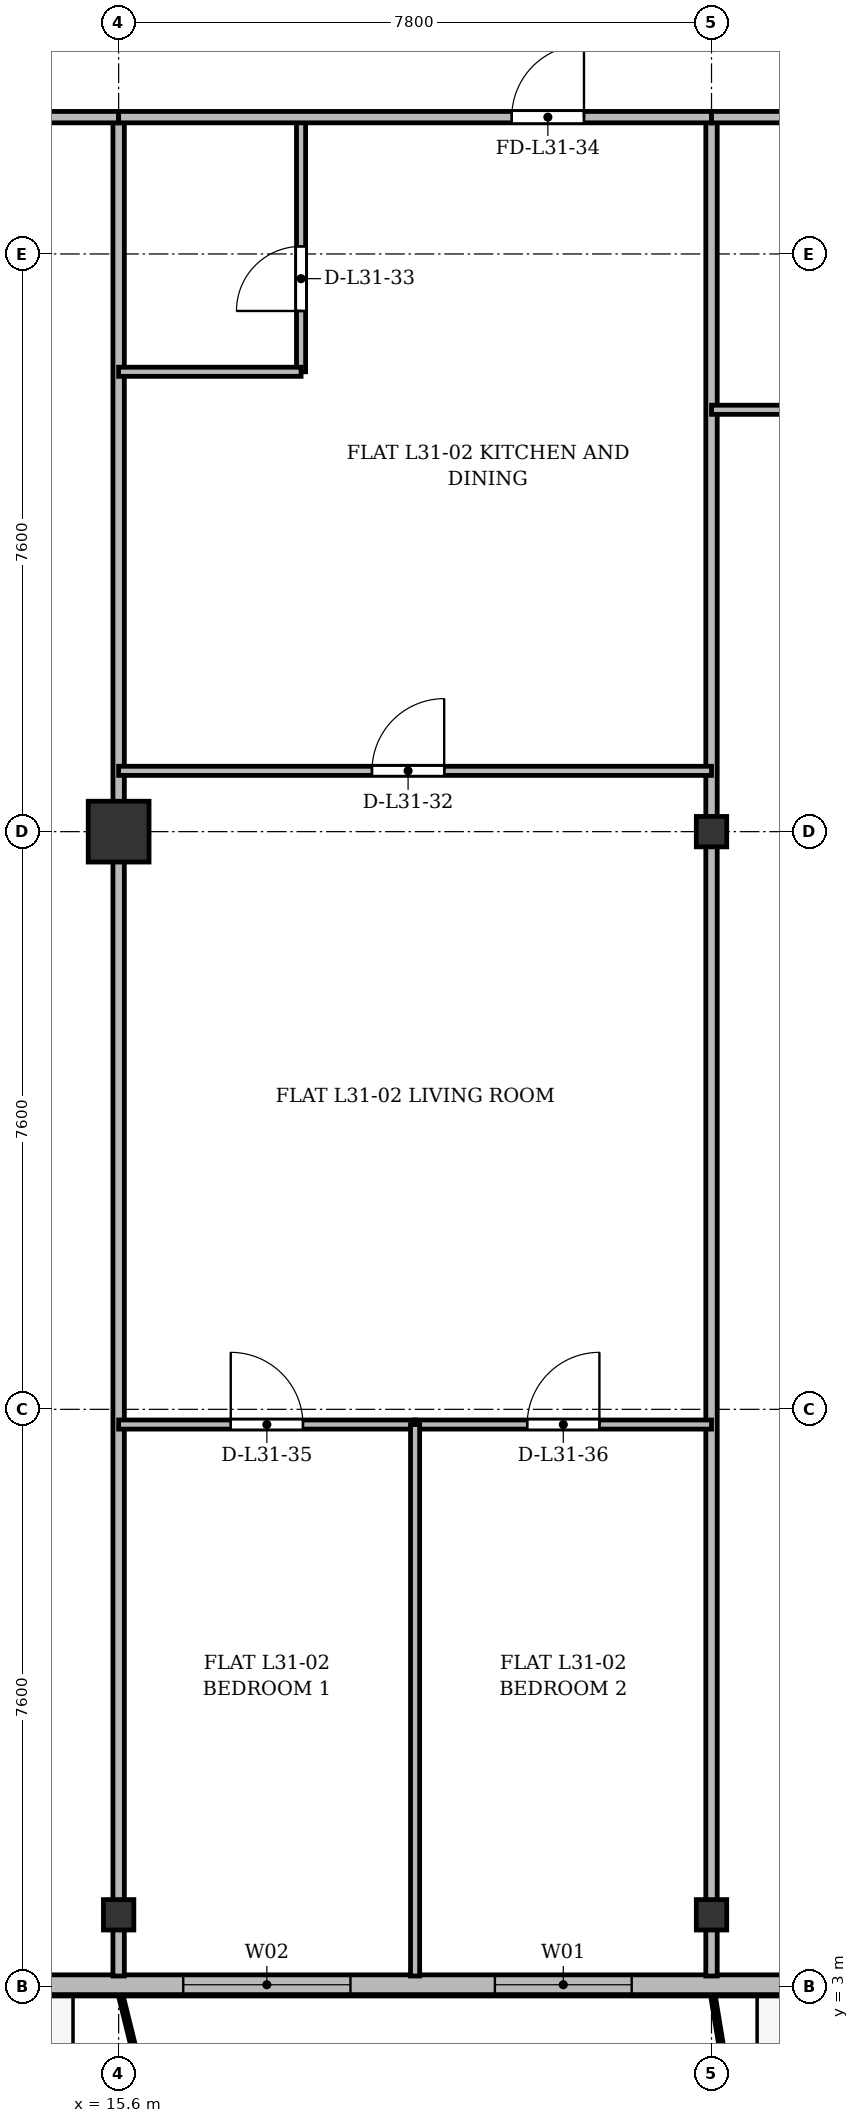
"""IFC4 building model, lengths in metres.
Left out: names, types, materials, properties, quantities, classifications, styles, units other than length and angle.
Written with IfcOpenShell. Run it as: python <this file> out.ifc"""

import sys

from ifc_helpers import new_model, si_unit, direction, frame, frame_2d, origin, origin_2d, place, context, subcontext, project, spatial, rectangle, i_section, extrude, source, transform, mapped, element, fill, save


model = new_model("IFC4")
c1 = context("Model", 3, precision=1e-05, world=origin(), true_north=direction((0.0, 1.0)))
c2 = subcontext(c1, "Body", "Model", "MODEL_VIEW")
j1 = project(units=[si_unit("LENGTHUNIT", "METRE"), si_unit("PLANEANGLEUNIT", "RADIAN")], contexts=[c1])
p1 = place(None, origin())
s1 = spatial("IfcSite", under=j1, at=p1, CompositionType="ELEMENT")
p2 = place(p1, origin())
s2 = spatial("IfcBuilding", under=s1, at=p2, CompositionType="ELEMENT")
p3 = place(p2, frame((0.0, 0.0, 121.3)))
s3 = spatial("IfcBuildingStorey", under=s2, at=p3, CompositionType="ELEMENT", Elevation=121.3)
m1 = source(origin(), c2, "Body", "SweptSolid", [
    extrude(i_section(OverallWidth=0.4, OverallDepth=0.4, WebThickness=0.022, FlangeThickness=0.035, at=origin_2d()), origin(), (0.0, 0.0, 1.0), 3.6),
])
p4 = place(p3, frame((15.6, 3.95, 0.0), z_axis=(0.0, 0.0, 1.0), x_axis=(1.0, 0.0, 0.0)))
e1 = element("IfcColumn", 1, at=p4, inside=s3, PredefinedType="COLUMN", context=c2, shape_type="MappedRepresentation", body=[
    mapped(m1, transform((0.0, 0.0, 0.0), x_axis=(1.0, 0.0, 0.0), y_axis=(0.0, 1.0, 0.0), z_axis=(0.0, 0.0, 1.0), scale=1.0)),
])
m2 = source(origin(), c2, "Body", "SweptSolid", [
    extrude(rectangle(XDim=0.8, YDim=0.8, at=origin_2d()), origin(), (0.0, 0.0, 1.0), 3.6),
])
p5 = place(p3, frame((15.6, 18.2, 0.0), z_axis=(0.0, 0.0, 1.0), x_axis=(1.0, 0.0, 0.0)))
e2 = element("IfcColumn", 2, at=p5, inside=s3, PredefinedType="COLUMN", context=c2, shape_type="MappedRepresentation", body=[
    mapped(m2, transform((0.0, 0.0, 0.0), x_axis=(1.0, 0.0, 0.0), y_axis=(0.0, 1.0, 0.0), z_axis=(0.0, 0.0, 1.0), scale=1.0)),
])
for number, where, z_axis, x_axis in (
    (3, (23.4, 3.95, 0.0), (0.0, 0.0, 1.0), (1.0, 0.0, 0.0)),
    (4, (23.4, 18.2, 0.0), (0.0, 0.0, 1.0), (1.0, 0.0, 0.0)),
):
    element("IfcColumn", number, at=place(p3, frame(where, z_axis=z_axis, x_axis=x_axis)), inside=s3, PredefinedType="COLUMN", context=c2, shape_type="MappedRepresentation", body=[
        mapped(m1, transform((0.0, 0.0, 0.0), x_axis=(1.0, 0.0, 0.0), y_axis=(0.0, 1.0, 0.0), z_axis=(0.0, 0.0, 1.0), scale=1.0)),
    ])
p6 = place(p3, frame((44.8, 3.03, 0.0), z_axis=(0.0, 0.0, 1.0), x_axis=(-1.0, 0.0, 0.0)))
e5 = element("IfcWall", 5, at=p6, inside=s3, PredefinedType="SOLIDWALL", context=c2, shape_type="SweptSolid", body=[
    extrude(rectangle(XDim=37.3, YDim=0.26, at=frame_2d((18.65, 0.0))), origin(), (0.0, 0.0, 1.0), 3.34),
])
p7 = place(p6, frame((3.15, 0.0, 0.9)))
e6 = element("IfcOpeningElement", 6, at=p7, cuts=e5, PredefinedType="OPENING", context=c2, shape_type="SweptSolid", body=[
    extrude(rectangle(XDim=1.5, YDim=1.75, at=frame_2d((0.75, 0.875))), frame((0.0, 0.14, 0.0), z_axis=(0.0, -1.0, 0.0), x_axis=(1.0, 0.0, 0.0)), (0.0, 0.0, 1.0), 0.28),
])
p8 = place(p6, frame((9.5, 0.0, 0.9)))
e7 = element("IfcOpeningElement", 7, at=p8, cuts=e5, PredefinedType="OPENING", context=c2, shape_type="SweptSolid", body=[
    extrude(rectangle(XDim=2.0, YDim=1.95, at=frame_2d((1.0, 0.975))), frame((0.0, 0.14, 0.0), z_axis=(0.0, -1.0, 0.0), x_axis=(1.0, 0.0, 0.0)), (0.0, 0.0, 1.0), 0.28),
])
p9 = place(p6, frame((17.109, 0.0, 0.0)))
e8 = element("IfcOpeningElement", 8, at=p9, cuts=e5, PredefinedType="OPENING", context=c2, shape_type="SweptSolid", body=[
    extrude(rectangle(XDim=1.2, YDim=2.2, at=frame_2d((0.6, 1.1))), frame((0.0, 0.14, 0.0), z_axis=(0.0, -1.0, 0.0), x_axis=(1.0, 0.0, 0.0)), (0.0, 0.0, 1.0), 0.28),
])
p10 = place(p6, frame((22.45, 0.0, 0.9)))
e9 = element("IfcOpeningElement", 9, at=p10, cuts=e5, PredefinedType="OPENING", context=c2, shape_type="SweptSolid", body=[
    extrude(rectangle(XDim=1.8, YDim=1.8, at=frame_2d((0.9, 0.9))), frame((0.0, 0.14, 0.0), z_axis=(0.0, -1.0, 0.0), x_axis=(1.0, 0.0, 0.0)), (0.0, 0.0, 1.0), 0.28),
])
p11 = place(p6, frame((26.15, 0.0, 0.9)))
e10 = element("IfcOpeningElement", 10, at=p11, cuts=e5, PredefinedType="OPENING", context=c2, shape_type="SweptSolid", body=[
    extrude(rectangle(XDim=2.2, YDim=1.8, at=frame_2d((1.1, 0.9))), frame((0.0, 0.14, 0.0), z_axis=(0.0, -1.0, 0.0), x_axis=(1.0, 0.0, 0.0)), (0.0, 0.0, 1.0), 0.28),
])
p12 = place(p6, frame((33.727, 0.0, 0.0)))
e11 = element("IfcOpeningElement", 11, at=p12, cuts=e5, PredefinedType="OPENING", context=c2, shape_type="SweptSolid", body=[
    extrude(rectangle(XDim=1.2, YDim=2.2, at=frame_2d((0.6, 1.1))), frame((0.0, 0.14, 0.0), z_axis=(0.0, -1.0, 0.0), x_axis=(1.0, 0.0, 0.0)), (0.0, 0.0, 1.0), 0.28),
])
for number, where, z_axis, x_axis in (
    (12, (15.6, 3.145, 0.0), (0.0, 0.0, 1.0), (0.0, 1.0, 0.0)),
    (13, (23.4, 3.145, 0.0), (0.0, 0.0, 1.0), (0.0, 1.0, 0.0)),
):
    element("IfcWall", number, at=place(p3, frame(where, z_axis=z_axis, x_axis=x_axis)), inside=s3, PredefinedType="PARTITIONING", context=c2, shape_type="SweptSolid", body=[
        extrude(rectangle(XDim=24.455, YDim=0.15, at=frame_2d((12.228, 0.0))), origin(), (0.0, 0.0, 1.0), 2.84),
    ])
p13 = place(p3, frame((4.745, 27.6, 0.0), z_axis=(0.0, 0.0, 1.0), x_axis=(1.0, 0.0, 0.0)))
e14 = element("IfcWall", 14, at=p13, inside=s3, PredefinedType="PARTITIONING", context=c2, shape_type="SweptSolid", body=[
    extrude(rectangle(XDim=10.855, YDim=0.15, at=frame_2d((5.427, 0.0))), origin(), (0.0, 0.0, 1.0), 2.84),
])
p14 = place(p13, frame((4.537, 0.0, 0.0)))
e15 = element("IfcOpeningElement", 15, at=p14, cuts=e14, PredefinedType="OPENING", context=c2, shape_type="SweptSolid", body=[
    extrude(rectangle(XDim=1.6, YDim=2.2, at=frame_2d((0.8, 1.1))), frame((0.0, 0.085, 0.0), z_axis=(0.0, -1.0, 0.0), x_axis=(1.0, 0.0, 0.0)), (0.0, 0.0, 1.0), 0.17),
])
p15 = place(p3, frame((15.6, 19.0, 0.0), z_axis=(0.0, 0.0, 1.0), x_axis=(1.0, 0.0, 0.0)))
e16 = element("IfcWall", 16, at=p15, inside=s3, PredefinedType="PARTITIONING", context=c2, shape_type="SweptSolid", body=[
    extrude(rectangle(XDim=7.8, YDim=0.12, at=frame_2d((3.9, 0.0))), origin(), (0.0, 0.0, 1.0), 2.84),
])
p16 = place(p15, frame((3.333, 0.0, 0.0)))
e17 = element("IfcOpeningElement", 17, at=p16, cuts=e16, PredefinedType="OPENING", context=c2, shape_type="SweptSolid", body=[
    extrude(rectangle(XDim=0.95, YDim=2.15, at=frame_2d((0.475, 1.075))), frame((0.0, 0.07, 0.0), z_axis=(0.0, -1.0, 0.0), x_axis=(1.0, 0.0, 0.0)), (0.0, 0.0, 1.0), 0.14),
])
p17 = place(p3, frame((18.0, 24.25, 0.0), z_axis=(0.0, 0.0, 1.0), x_axis=(0.0, 1.0, 0.0)))
e18 = element("IfcWall", 18, at=p17, inside=s3, PredefinedType="PARTITIONING", context=c2, shape_type="SweptSolid", body=[
    extrude(rectangle(XDim=3.35, YDim=0.12, at=frame_2d((1.675, 0.0))), origin(), (0.0, 0.0, 1.0), 2.99),
])
p18 = place(p17, frame((0.8, 0.0, 0.0)))
e19 = element("IfcOpeningElement", 19, at=p18, cuts=e18, PredefinedType="OPENING", context=c2, shape_type="SweptSolid", body=[
    extrude(rectangle(XDim=0.85, YDim=2.1, at=frame_2d((0.425, 1.05))), frame((0.0, 0.07, 0.0), z_axis=(0.0, -1.0, 0.0), x_axis=(1.0, 0.0, 0.0)), (0.0, 0.0, 1.0), 0.14),
])
p19 = place(p3, frame((15.6, 24.25, 0.0), z_axis=(0.0, 0.0, 1.0), x_axis=(1.0, 0.0, 0.0)))
e20 = element("IfcWall", 20, at=p19, inside=s3, PredefinedType="PARTITIONING", context=c2, shape_type="SweptSolid", body=[
    extrude(rectangle(XDim=2.4, YDim=0.12, at=frame_2d((1.2, 0.0))), origin(), (0.0, 0.0, 1.0), 2.84),
])
p20 = place(p3, frame((15.6, 27.6, 0.0), z_axis=(0.0, 0.0, 1.0), x_axis=(1.0, 0.0, 0.0)))
e21 = element("IfcWall", 21, at=p20, inside=s3, PredefinedType="PARTITIONING", context=c2, shape_type="SweptSolid", body=[
    extrude(rectangle(XDim=7.8, YDim=0.15, at=frame_2d((3.9, 0.0))), origin(), (0.0, 0.0, 1.0), 2.84),
])
p21 = place(p20, frame((5.172, 0.0, 0.0)))
e22 = element("IfcOpeningElement", 22, at=p21, cuts=e21, PredefinedType="OPENING", context=c2, shape_type="SweptSolid", body=[
    extrude(rectangle(XDim=0.95, YDim=2.15, at=frame_2d((0.475, 1.075))), frame((0.0, 0.085, 0.0), z_axis=(0.0, -1.0, 0.0), x_axis=(1.0, 0.0, 0.0)), (0.0, 0.0, 1.0), 0.17),
])
p22 = place(p3, frame((15.6, 10.4, 0.0), z_axis=(0.0, 0.0, 1.0), x_axis=(1.0, 0.0, 0.0)))
e23 = element("IfcWall", 23, at=p22, inside=s3, PredefinedType="PARTITIONING", context=c2, shape_type="SweptSolid", body=[
    extrude(rectangle(XDim=3.9, YDim=0.12, at=frame_2d((1.95, 0.0))), origin(), (0.0, 0.0, 1.0), 2.84),
])
p23 = place(p22, frame((1.475, 0.0, 0.0)))
e24 = element("IfcOpeningElement", 24, at=p23, cuts=e23, PredefinedType="OPENING", context=c2, shape_type="SweptSolid", body=[
    extrude(rectangle(XDim=0.95, YDim=2.15, at=frame_2d((0.475, 1.075))), frame((0.0, 0.07, 0.0), z_axis=(0.0, -1.0, 0.0), x_axis=(1.0, 0.0, 0.0)), (0.0, 0.0, 1.0), 0.14),
])
p24 = place(p3, frame((19.5, 10.4, 0.0), z_axis=(0.0, 0.0, 1.0), x_axis=(1.0, 0.0, 0.0)))
e25 = element("IfcWall", 25, at=p24, inside=s3, PredefinedType="PARTITIONING", context=c2, shape_type="SweptSolid", body=[
    extrude(rectangle(XDim=3.9, YDim=0.12, at=frame_2d((1.95, 0.0))), origin(), (0.0, 0.0, 1.0), 2.84),
])
p25 = place(p24, frame((1.475, 0.0, 0.0)))
e26 = element("IfcOpeningElement", 26, at=p25, cuts=e25, PredefinedType="OPENING", context=c2, shape_type="SweptSolid", body=[
    extrude(rectangle(XDim=0.95, YDim=2.15, at=frame_2d((0.475, 1.075))), frame((0.0, 0.07, 0.0), z_axis=(0.0, -1.0, 0.0), x_axis=(1.0, 0.0, 0.0)), (0.0, 0.0, 1.0), 0.14),
])
p26 = place(p3, frame((19.5, 3.145, 0.0), z_axis=(0.0, 0.0, 1.0), x_axis=(0.0, 1.0, 0.0)))
e27 = element("IfcWall", 27, at=p26, inside=s3, PredefinedType="PARTITIONING", context=c2, shape_type="SweptSolid", body=[
    extrude(rectangle(XDim=7.255, YDim=0.12, at=frame_2d((3.627, 0.0))), origin(), (0.0, 0.0, 1.0), 2.752),
])
p27 = place(p3, frame((23.4, 27.6, 0.0), z_axis=(0.0, 0.0, 1.0), x_axis=(1.0, 0.0, 0.0)))
e28 = element("IfcWall", 28, at=p27, inside=s3, PredefinedType="PARTITIONING", context=c2, shape_type="SweptSolid", body=[
    extrude(rectangle(XDim=7.2, YDim=0.15, at=frame_2d((3.6, 0.0))), origin(), (0.0, 0.0, 1.0), 2.84),
])
p28 = place(p27, frame((3.125, 0.0, 0.0)))
e29 = element("IfcOpeningElement", 29, at=p28, cuts=e28, PredefinedType="OPENING", context=c2, shape_type="SweptSolid", body=[
    extrude(rectangle(XDim=0.95, YDim=2.15, at=frame_2d((0.475, 1.075))), frame((0.0, 0.085, 0.0), z_axis=(0.0, -1.0, 0.0), x_axis=(1.0, 0.0, 0.0)), (0.0, 0.0, 1.0), 0.17),
])
p29 = place(p3, frame((23.4, 23.75, 0.0), z_axis=(0.0, 0.0, 1.0), x_axis=(1.0, 0.0, 0.0)))
e30 = element("IfcWall", 30, at=p29, inside=s3, PredefinedType="PARTITIONING", context=c2, shape_type="SweptSolid", body=[
    extrude(rectangle(XDim=7.2, YDim=0.12, at=frame_2d((3.6, 0.0))), origin(), (0.0, 0.0, 1.0), 2.84),
])
p30 = place(p29, frame((3.125, 0.0, 0.0)))
e31 = element("IfcOpeningElement", 31, at=p30, cuts=e30, PredefinedType="OPENING", context=c2, shape_type="SweptSolid", body=[
    extrude(rectangle(XDim=0.95, YDim=2.15, at=frame_2d((0.475, 1.075))), frame((0.0, 0.07, 0.0), z_axis=(0.0, -1.0, 0.0), x_axis=(1.0, 0.0, 0.0)), (0.0, 0.0, 1.0), 0.14),
])
m3 = source(origin(), c2, "Body", "SweptSolid", [
    extrude(rectangle(XDim=1.8, YDim=1.8, at=frame_2d((0.9, 0.9))), frame((0.0, 0.03, 0.0), z_axis=(0.0, -1.0, 0.0), x_axis=(1.0, 0.0, 0.0)), (0.0, 0.0, 1.0), 0.06),
])
p31 = place(p10, origin())
e32 = element("IfcWindow", 32, at=p31, inside=s3, PartitioningType="SINGLE_PANEL", PredefinedType="WINDOW", context=c2, shape_type="MappedRepresentation", body=[
    mapped(m3, transform((0.0, 0.0, 0.0), x_axis=(1.0, 0.0, 0.0), y_axis=(0.0, 1.0, 0.0), z_axis=(0.0, 0.0, 1.0), scale=1.0)),
])
fill(e9, e32)
m4 = source(origin(), c2, "Body", "SweptSolid", [
    extrude(rectangle(XDim=2.2, YDim=1.8, at=frame_2d((1.1, 0.9))), frame((0.0, 0.03, 0.0), z_axis=(0.0, -1.0, 0.0), x_axis=(1.0, 0.0, 0.0)), (0.0, 0.0, 1.0), 0.06),
])
p32 = place(p11, origin())
e33 = element("IfcWindow", 33, at=p32, inside=s3, PartitioningType="SINGLE_PANEL", PredefinedType="WINDOW", context=c2, shape_type="MappedRepresentation", body=[
    mapped(m4, transform((0.0, 0.0, 0.0), x_axis=(1.0, 0.0, 0.0), y_axis=(0.0, 1.0, 0.0), z_axis=(0.0, 0.0, 1.0), scale=1.0)),
])
fill(e10, e33)
m5 = source(origin(), c2, "Body", "SweptSolid", [
    extrude(rectangle(XDim=0.95, YDim=2.15, at=frame_2d((0.475, 1.075))), frame((0.0, 0.025, 0.0), z_axis=(0.0, -1.0, 0.0), x_axis=(1.0, 0.0, 0.0)), (0.0, 0.0, 1.0), 0.05),
])
p33 = place(p16, origin())
e34 = element("IfcDoor", 34, at=p33, inside=s3, OperationType="SINGLE_SWING_RIGHT", PredefinedType="DOOR", context=c2, shape_type="MappedRepresentation", body=[
    mapped(m5, transform((0.0, 0.0, 0.0), x_axis=(1.0, 0.0, 0.0), y_axis=(0.0, 1.0, 0.0), z_axis=(0.0, 0.0, 1.0), scale=1.0)),
])
fill(e17, e34)
m6 = source(origin(), c2, "Body", "SweptSolid", [
    extrude(rectangle(XDim=0.85, YDim=2.1, at=frame_2d((0.425, 1.05))), frame((0.0, 0.025, 0.0), z_axis=(0.0, -1.0, 0.0), x_axis=(1.0, 0.0, 0.0)), (0.0, 0.0, 1.0), 0.05),
])
p34 = place(p18, origin())
e35 = element("IfcDoor", 35, at=p34, inside=s3, OperationType="SINGLE_SWING_LEFT", PredefinedType="DOOR", context=c2, shape_type="MappedRepresentation", body=[
    mapped(m6, transform((0.0, 0.0, 0.0), x_axis=(1.0, 0.0, 0.0), y_axis=(0.0, 1.0, 0.0), z_axis=(0.0, 0.0, 1.0), scale=1.0)),
])
fill(e19, e35)
p35 = place(p21, origin())
e36 = element("IfcDoor", 36, at=p35, inside=s3, OperationType="SINGLE_SWING_RIGHT", PredefinedType="DOOR", context=c2, shape_type="MappedRepresentation", body=[
    mapped(m5, transform((0.0, 0.0, 0.0), x_axis=(1.0, 0.0, 0.0), y_axis=(0.0, 1.0, 0.0), z_axis=(0.0, 0.0, 1.0), scale=1.0)),
])
fill(e22, e36)
p36 = place(p23, origin())
e37 = element("IfcDoor", 37, at=p36, inside=s3, OperationType="SINGLE_SWING_LEFT", PredefinedType="DOOR", context=c2, shape_type="MappedRepresentation", body=[
    mapped(m5, transform((0.0, 0.0, 0.0), x_axis=(1.0, 0.0, 0.0), y_axis=(0.0, 1.0, 0.0), z_axis=(0.0, 0.0, 1.0), scale=1.0)),
])
fill(e24, e37)
p37 = place(p25, origin())
e38 = element("IfcDoor", 38, at=p37, inside=s3, OperationType="SINGLE_SWING_RIGHT", PredefinedType="DOOR", context=c2, shape_type="MappedRepresentation", body=[
    mapped(m5, transform((0.0, 0.0, 0.0), x_axis=(1.0, 0.0, 0.0), y_axis=(0.0, 1.0, 0.0), z_axis=(0.0, 0.0, 1.0), scale=1.0)),
])
fill(e26, e38)
save(model, sys.argv[1])
